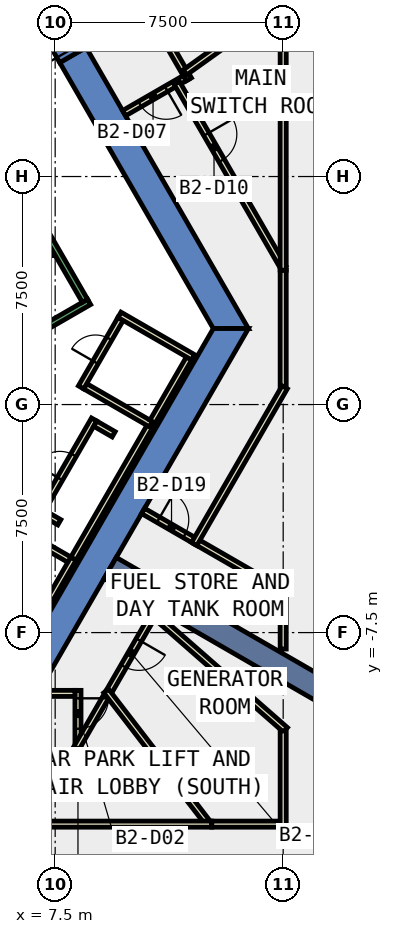
"""IFC4 building model, lengths in metres.
Left out: names, types, materials, properties, quantities, classifications, styles, units other than length and angle.
Written with IfcOpenShell. Run it as: python <this file> out.ifc"""

import sys

from ifc_helpers import new_model, si_unit, direction, frame, frame_2d, origin, place, context, subcontext, project, spatial, polyline, rectangle, outline, extrude, element, fill, save


model = new_model("IFC4")
c1 = context("Model", 3, precision=1e-05, world=origin(), true_north=direction((0.0, 1.0)))
c2 = subcontext(c1, "Body", "Model", "MODEL_VIEW")
j1 = project(units=[si_unit("LENGTHUNIT", "METRE"), si_unit("PLANEANGLEUNIT", "RADIAN")], contexts=[c1])
p1 = place(None, origin())
s1 = spatial("IfcSite", under=j1, at=p1, CompositionType="ELEMENT")
p2 = place(p1, origin())
s2 = spatial("IfcBuilding", under=s1, at=p2, CompositionType="ELEMENT")
p3 = place(p2, frame((0.0, 0.0, -11.0)))
s3 = spatial("IfcBuildingStorey", under=s2, at=p3, CompositionType="ELEMENT", Elevation=-11.0)
p4 = place(p3, frame((0.0, 0.0, -0.42)))
e1 = element("IfcWall", 1, at=p4, inside=s3, PredefinedType="SHEAR", context=c2, shape_type="SweptSolid", body=[
    extrude(outline(polyline([(8.517, 11.748), (7.651, 11.248), (12.702, 2.5), (13.856, 2.5), (8.517, 11.748)])), origin(), (0.0, 0.0, 1.0), 5.5),
])
p5 = place(p3, frame((0.0, 0.0, 3.6)))
e2 = element("IfcWall", 2, at=p5, inside=s3, PredefinedType="SHEAR", context=c2, shape_type="SweptSolid", body=[
    extrude(outline(polyline([(7.517, 13.48), (6.651, 12.98), (7.651, 11.248), (8.517, 11.748), (7.517, 13.48)])), origin(), (0.0, 0.0, 1.0), 1.48),
])
p6 = place(p3, frame((0.0, 0.0, -0.42)))
e3 = element("IfcWall", 3, at=p6, inside=s3, PredefinedType="SHEAR", context=c2, shape_type="SweptSolid", body=[
    extrude(outline(polyline([(6.928, -9.5), (13.856, 2.5), (12.702, 2.5), (6.351, -8.5), (6.928, -9.5)])), origin(), (0.0, 0.0, 1.0), 5.5),
])
p7 = place(p3, frame((9.31, -5.375, -0.42), z_axis=(0.0, 0.0, 1.0), x_axis=(0.866017533419, -0.500013631625, 0.0)))
e4 = element("IfcWall", 4, at=p7, inside=s3, PredefinedType="SHEAR", context=c2, shape_type="SweptSolid", body=[
    extrude(rectangle(XDim=9.0, YDim=0.8, at=frame_2d((4.5, 0.0))), origin(), (0.0, 0.0, 1.0), 5.5),
])
p8 = place(p3, frame((8.25, -9.4, 0.0), z_axis=(0.0, 0.0, 1.0), x_axis=(0.0, -1.0, 0.0)))
e5 = element("IfcWall", 5, at=p8, inside=s3, PredefinedType="PARTITIONING", context=c2, shape_type="SweptSolid", body=[
    extrude(rectangle(XDim=1.71, YDim=0.2, at=frame_2d((0.855, 0.0))), origin(), (0.0, 0.0, 1.0), 5.05),
])
p9 = place(p8, frame((0.262, 0.0, 0.0)))
e6 = element("IfcOpeningElement", 6, at=p9, cuts=e5, PredefinedType="OPENING", context=c2, shape_type="SweptSolid", body=[
    extrude(rectangle(XDim=1.0, YDim=2.1, at=frame_2d((0.5, 1.05))), frame((0.0, 0.11, 0.0), z_axis=(0.0, -1.0, 0.0), x_axis=(1.0, 0.0, 0.0)), (0.0, 0.0, 1.0), 0.22),
])
p10 = place(p3, frame((6.928, -9.5, 0.0), z_axis=(0.0, 0.0, 1.0), x_axis=(1.0, 0.0, 0.0)))
e7 = element("IfcWall", 7, at=p10, inside=s3, PredefinedType="PARTITIONING", context=c2, shape_type="SweptSolid", body=[
    extrude(rectangle(XDim=1.222, YDim=0.2, at=frame_2d((0.611, 0.0))), origin(), (0.0, 0.0, 1.0), 5.05),
])
p11 = place(p3, frame((8.25, -11.31, 0.0), z_axis=(0.0, 0.0, 1.0), x_axis=(0.0, -1.0, 0.0)))
e8 = element("IfcWall", 8, at=p11, inside=s3, PredefinedType="PARTITIONING", context=c2, shape_type="SweptSolid", body=[
    extrude(rectangle(XDim=0.49, YDim=0.2, at=frame_2d((0.245, 0.0))), origin(), (0.0, 0.0, 1.0), 5.05),
])
p12 = place(p3, frame((8.35, -11.9, 0.0), z_axis=(0.0, 0.0, 1.0), x_axis=(-1.0, 0.0, 0.0)))
e9 = element("IfcWall", 9, at=p12, inside=s3, PredefinedType="PARTITIONING", context=c2, shape_type="SweptSolid", body=[
    extrude(rectangle(XDim=7.039, YDim=0.2, at=frame_2d((3.52, 0.0))), origin(), (0.0, 0.0, 1.0), 5.05),
])
p13 = place(p12, frame((2.659, 0.0, 0.0)))
e10 = element("IfcOpeningElement", 10, at=p13, cuts=e9, PredefinedType="OPENING", context=c2, shape_type="SweptSolid", body=[
    extrude(rectangle(XDim=1.0, YDim=2.1, at=frame_2d((0.5, 1.05))), frame((0.0, 0.11, 0.0), z_axis=(0.0, -1.0, 0.0), x_axis=(1.0, 0.0, 0.0)), (0.0, 0.0, 1.0), 0.22),
])
p14 = place(p3, frame((9.238, -9.498, 0.0), z_axis=(0.0, 0.0, 1.0), x_axis=(-0.499780113518, -0.866152318089, 0.0)))
e11 = element("IfcWall", 11, at=p14, inside=s3, PredefinedType="PARTITIONING", context=c2, shape_type="SweptSolid", body=[
    extrude(rectangle(XDim=2.077, YDim=0.2, at=frame_2d((1.039, 0.0))), origin(), (0.0, 0.0, 1.0), 5.05),
])
p15 = place(p3, frame((10.738, -6.901, 0.0), z_axis=(0.0, 0.0, 1.0), x_axis=(-0.500131122175, -0.865949687125, 0.0)))
e12 = element("IfcWall", 12, at=p15, inside=s3, PredefinedType="PARTITIONING", context=c2, shape_type="SweptSolid", body=[
    extrude(rectangle(XDim=2.999, YDim=0.2, at=frame_2d((1.5, 0.0))), origin(), (0.0, 0.0, 1.0), 5.05),
])
p16 = place(p15, frame((0.972, 0.0, 0.0)))
e13 = element("IfcOpeningElement", 13, at=p16, cuts=e12, PredefinedType="OPENING", context=c2, shape_type="SweptSolid", body=[
    extrude(rectangle(XDim=1.0, YDim=2.1, at=frame_2d((0.5, 1.05))), frame((0.0, 0.11, 0.0), z_axis=(0.0, -1.0, 0.0), x_axis=(1.0, 0.0, 0.0)), (0.0, 0.0, 1.0), 0.22),
])
p17 = place(p3, frame((9.177, -9.419, 0.0), z_axis=(0.0, 0.0, 1.0), x_axis=(0.610158732695, -0.792279193792, 0.0)))
e14 = element("IfcWall", 14, at=p17, inside=s3, PredefinedType="PARTITIONING", context=c2, shape_type="SweptSolid", body=[
    extrude(rectangle(XDim=5.53, YDim=0.2, at=frame_2d((2.765, 0.0))), origin(), (0.0, 0.0, 1.0), 5.05),
])
p18 = place(p3, frame((12.651, -13.8, 0.0), z_axis=(0.0, 0.0, 1.0), x_axis=(-1.0, 0.0, 0.0)))
e15 = element("IfcWall", 15, at=p18, inside=s3, PredefinedType="PARTITIONING", context=c2, shape_type="SweptSolid", body=[
    extrude(rectangle(XDim=11.154, YDim=0.2, at=frame_2d((5.577, 0.0))), origin(), (0.0, 0.0, 1.0), 5.05),
])
p19 = place(p18, frame((6.675, 0.0, 0.0)))
e16 = element("IfcOpeningElement", 16, at=p19, cuts=e15, PredefinedType="OPENING", context=c2, shape_type="SweptSolid", body=[
    extrude(rectangle(XDim=1.8, YDim=2.1, at=frame_2d((0.9, 1.05))), frame((0.0, 0.11, 0.0), z_axis=(0.0, -1.0, 0.0), x_axis=(1.0, 0.0, 0.0)), (0.0, 0.0, 1.0), 0.22),
])
p20 = place(p3, frame((14.9, -13.8, 0.0), z_axis=(0.0, 0.0, 1.0), x_axis=(-1.0, 0.0, 0.0)))
e17 = element("IfcWall", 17, at=p20, inside=s3, PredefinedType="PARTITIONING", context=c2, shape_type="SweptSolid", body=[
    extrude(rectangle(XDim=2.249, YDim=0.2, at=frame_2d((1.125, 0.0))), origin(), (0.0, 0.0, 1.0), 5.05),
])
p21 = place(p3, frame((10.663, -6.835, 0.0), z_axis=(0.0, 0.0, 1.0), x_axis=(0.752269740493, -0.658855247788, 0.0)))
e18 = element("IfcWall", 18, at=p21, inside=s3, PredefinedType="PARTITIONING", context=c2, shape_type="SweptSolid", body=[
    extrude(rectangle(XDim=5.865, YDim=0.2, at=frame_2d((2.932, 0.0))), origin(), (0.0, 0.0, 1.0), 5.05),
])
p22 = place(p3, frame((15.0, -10.733, 0.0), z_axis=(0.0, 0.0, 1.0), x_axis=(0.0, -1.0, 0.0)))
e19 = element("IfcWall", 19, at=p22, inside=s3, PredefinedType="PARTITIONING", context=c2, shape_type="SweptSolid", body=[
    extrude(rectangle(XDim=3.167, YDim=0.2, at=frame_2d((1.583, 0.0))), origin(), (0.0, 0.0, 1.0), 5.05),
])
p23 = place(p3, frame((10.392, -3.5, 0.0), z_axis=(0.0, 0.0, 1.0), x_axis=(0.866010750942, -0.50002537861, 0.0)))
e20 = element("IfcWall", 20, at=p23, inside=s3, PredefinedType="PARTITIONING", context=c2, shape_type="SweptSolid", body=[
    extrude(rectangle(XDim=2.0, YDim=0.2, at=frame_2d((1.0, 0.0))), origin(), (0.0, 0.0, 1.0), 5.05),
])
p24 = place(p23, frame((0.58, 0.0, 0.0)))
e21 = element("IfcOpeningElement", 21, at=p24, cuts=e20, PredefinedType="OPENING", context=c2, shape_type="SweptSolid", body=[
    extrude(rectangle(XDim=1.0, YDim=2.1, at=frame_2d((0.5, 1.05))), frame((0.0, 0.11, 0.0), z_axis=(0.0, -1.0, 0.0), x_axis=(1.0, 0.0, 0.0)), (0.0, 0.0, 1.0), 0.22),
])
p25 = place(p3, frame((12.124, -4.5, 0.0), z_axis=(0.0, 0.0, 1.0), x_axis=(0.866109535743, -0.499854250852, 0.0)))
e22 = element("IfcWall", 22, at=p25, inside=s3, PredefinedType="PARTITIONING", context=c2, shape_type="SweptSolid", body=[
    extrude(rectangle(XDim=3.421, YDim=0.2, at=frame_2d((1.71, 0.0))), origin(), (0.0, 0.0, 1.0), 5.05),
])
p26 = place(p3, frame((15.0, -6.26, 0.0), z_axis=(0.0, 0.0, 1.0), x_axis=(0.0, -1.0, 0.0)))
e23 = element("IfcWall", 23, at=p26, inside=s3, PredefinedType="PARTITIONING", context=c2, shape_type="SweptSolid", body=[
    extrude(rectangle(XDim=1.781, YDim=0.2, at=frame_2d((0.891, 0.0))), origin(), (0.0, 0.0, 1.0), 5.05),
])
p27 = place(p3, frame((11.845, 10.783, 0.0), z_axis=(0.0, 0.0, 1.0), x_axis=(-0.865973769406, -0.500089422704, 0.0)))
e24 = element("IfcWall", 24, at=p27, inside=s3, PredefinedType="PARTITIONING", context=c2, shape_type="SweptSolid", body=[
    extrude(rectangle(XDim=2.399, YDim=0.2, at=frame_2d((1.2, 0.0))), origin(), (0.0, 0.0, 1.0), 5.05),
])
p28 = place(p27, frame((0.8, 0.0, 0.0)))
e25 = element("IfcOpeningElement", 25, at=p28, cuts=e24, PredefinedType="OPENING", context=c2, shape_type="SweptSolid", body=[
    extrude(rectangle(XDim=1.0, YDim=2.1, at=frame_2d((0.5, 1.05))), frame((0.0, 0.11, 0.0), z_axis=(0.0, -1.0, 0.0), x_axis=(1.0, 0.0, 0.0)), (0.0, 0.0, 1.0), 0.22),
])
p29 = place(p3, frame((8.295, 16.932, 0.0), z_axis=(0.0, 0.0, 1.0), x_axis=(0.499982693035, -0.866035395735, 0.0)))
e26 = element("IfcWall", 26, at=p29, inside=s3, PredefinedType="PARTITIONING", context=c2, shape_type="SweptSolid", body=[
    extrude(rectangle(XDim=7.2, YDim=0.2, at=frame_2d((3.6, 0.0))), origin(), (0.0, 0.0, 1.0), 5.05),
])
p30 = place(p29, frame((2.659, 0.0, 0.0)))
e27 = element("IfcOpeningElement", 27, at=p30, cuts=e26, PredefinedType="OPENING", context=c2, shape_type="SweptSolid", body=[
    extrude(rectangle(XDim=1.0, YDim=2.1, at=frame_2d((0.5, 1.05))), frame((0.0, 0.11, 0.0), z_axis=(0.0, -1.0, 0.0), x_axis=(1.0, 0.0, 0.0)), (0.0, 0.0, 1.0), 0.22),
])
p31 = place(p3, frame((11.499, 10.583, 0.0), z_axis=(0.0, 0.0, 1.0), x_axis=(0.499994090379, -0.866028815679, 0.0)))
e28 = element("IfcWall", 28, at=p31, inside=s3, PredefinedType="PARTITIONING", context=c2, shape_type="SweptSolid", body=[
    extrude(rectangle(XDim=7.002, YDim=0.2, at=frame_2d((3.501, 0.0))), origin(), (0.0, 0.0, 1.0), 5.05),
])
p32 = place(p31, frame((1.952, 0.0, 0.0)))
e29 = element("IfcOpeningElement", 29, at=p32, cuts=e28, PredefinedType="OPENING", context=c2, shape_type="SweptSolid", body=[
    extrude(rectangle(XDim=1.0, YDim=2.1, at=frame_2d((0.5, 1.05))), frame((0.0, 0.11, 0.0), z_axis=(0.0, -1.0, 0.0), x_axis=(1.0, 0.0, 0.0)), (0.0, 0.0, 1.0), 0.22),
])
p33 = place(p3, frame((15.0, 4.419, 0.0), z_axis=(0.0, 0.0, 1.0), x_axis=(0.0, -1.0, 0.0)))
e30 = element("IfcWall", 30, at=p33, inside=s3, PredefinedType="PARTITIONING", context=c2, shape_type="SweptSolid", body=[
    extrude(rectangle(XDim=3.838, YDim=0.2, at=frame_2d((1.919, 0.0))), origin(), (0.0, 0.0, 1.0), 5.05),
])
p34 = place(p3, frame((15.05, 0.568, 0.0), z_axis=(0.0, 0.0, 1.0), x_axis=(-0.500047946832, -0.865997719899, 0.0)))
e31 = element("IfcWall", 31, at=p34, inside=s3, PredefinedType="PARTITIONING", context=c2, shape_type="SweptSolid", body=[
    extrude(rectangle(XDim=5.952, YDim=0.2, at=frame_2d((2.976, 0.0))), origin(), (0.0, 0.0, 1.0), 5.05),
])
p35 = place(p3, frame((14.919, 13.18, 0.0), z_axis=(0.0, 0.0, 1.0), x_axis=(-0.81313339858, -0.582077379833, 0.0)))
e32 = element("IfcWall", 32, at=p35, inside=s3, PredefinedType="PARTITIONING", context=c2, shape_type="SweptSolid", body=[
    extrude(rectangle(XDim=3.879, YDim=0.2, at=frame_2d((1.939, 0.0))), origin(), (0.0, 0.0, 1.0), 5.05),
])
p36 = place(p3, frame((15.0, 13.138, 0.0), z_axis=(0.0, 0.0, 1.0), x_axis=(0.0, -1.0, 0.0)))
e33 = element("IfcWall", 33, at=p36, inside=s3, PredefinedType="PARTITIONING", context=c2, shape_type="SweptSolid", body=[
    extrude(rectangle(XDim=8.719, YDim=0.2, at=frame_2d((4.359, 0.0))), origin(), (0.0, 0.0, 1.0), 5.05),
])
p37 = place(p3, frame((5.888, -3.902, 0.0), z_axis=(0.0, 0.0, 1.0), x_axis=(0.866022959057, -0.500004234368, 0.0)))
e34 = element("IfcWall", 34, at=p37, inside=s3, PredefinedType="PARTITIONING", context=c2, shape_type="SweptSolid", body=[
    extrude(rectangle(XDim=2.5, YDim=0.2, at=frame_2d((1.25, 0.0))), origin(), (0.0, 0.0, 1.0), 5.05),
])
p38 = place(p3, frame((8.103, -5.065, 0.0), z_axis=(0.0, 0.0, 1.0), x_axis=(-0.49996627774, -0.866044872465, 0.0)))
e35 = element("IfcWall", 35, at=p38, inside=s3, PredefinedType="PARTITIONING", context=c2, shape_type="SweptSolid", body=[
    extrude(rectangle(XDim=2.6, YDim=0.2, at=frame_2d((1.3, 0.0))), origin(), (0.0, 0.0, 1.0), 5.05),
])
p39 = place(p3, frame((7.637, -3.872, 0.0), z_axis=(0.0, 0.0, 1.0), x_axis=(-0.866158505053, 0.499769390944, 0.0)))
e36 = element("IfcWall", 36, at=p39, inside=s3, PredefinedType="PARTITIONING", context=c2, shape_type="SweptSolid", body=[
    extrude(rectangle(XDim=0.6, YDim=0.2, at=frame_2d((0.3, 0.0))), origin(), (0.0, 0.0, 1.0), 5.05),
])
p40 = place(p3, frame((6.981, -3.609, 0.0), z_axis=(0.0, 0.0, 1.0), x_axis=(0.499982693035, 0.866035395735, 0.0)))
e37 = element("IfcWall", 37, at=p40, inside=s3, PredefinedType="PARTITIONING", context=c2, shape_type="SweptSolid", body=[
    extrude(rectangle(XDim=3.6, YDim=0.2, at=frame_2d((1.8, 0.0))), origin(), (0.0, 0.0, 1.0), 5.05),
])
p41 = place(p40, frame((1.35, 0.0, 0.0)))
e38 = element("IfcOpeningElement", 38, at=p41, cuts=e37, PredefinedType="OPENING", context=c2, shape_type="SweptSolid", body=[
    extrude(rectangle(XDim=0.9, YDim=2.1, at=frame_2d((0.45, 1.05))), frame((0.0, 0.11, 0.0), z_axis=(0.0, -1.0, 0.0), x_axis=(1.0, 0.0, 0.0)), (0.0, 0.0, 1.0), 0.22),
])
p42 = place(p3, frame((8.817, -0.628, 0.0), z_axis=(0.0, 0.0, 1.0), x_axis=(0.866307342011, -0.4995113504, 0.0)))
e39 = element("IfcWall", 39, at=p42, inside=s3, PredefinedType="PARTITIONING", context=c2, shape_type="SweptSolid", body=[
    extrude(rectangle(XDim=0.701, YDim=0.2, at=frame_2d((0.351, 0.0))), origin(), (0.0, 0.0, 1.0), 5.05),
])
p43 = place(p3, frame((10.703, -0.562, 0.0), z_axis=(0.0, 0.0, 1.0), x_axis=(-0.500012382935, -0.866018254376, 0.0)))
e40 = element("IfcWall", 40, at=p43, inside=s3, PredefinedType="PARTITIONING", context=c2, shape_type="SweptSolid", body=[
    extrude(rectangle(XDim=5.199, YDim=0.2, at=frame_2d((2.6, 0.0))), origin(), (0.0, 0.0, 1.0), 5.05),
])
p44 = place(p3, frame((10.653, -0.648, 0.0), z_axis=(0.0, 0.0, 1.0), x_axis=(-0.866022959057, 0.500004234368, 0.0)))
e41 = element("IfcWall", 41, at=p44, inside=s3, PredefinedType="PARTITIONING", context=c2, shape_type="SweptSolid", body=[
    extrude(rectangle(XDim=2.5, YDim=0.2, at=frame_2d((1.25, 0.0))), origin(), (0.0, 0.0, 1.0), 5.05),
])
p45 = place(p3, frame((11.903, 1.517, 0.0), z_axis=(0.0, 0.0, 1.0), x_axis=(-0.499945471869, -0.866056883327, 0.0)))
e42 = element("IfcWall", 42, at=p45, inside=s3, PredefinedType="PARTITIONING", context=c2, shape_type="SweptSolid", body=[
    extrude(rectangle(XDim=2.401, YDim=0.2, at=frame_2d((1.2, 0.0))), origin(), (0.0, 0.0, 1.0), 5.05),
])
p46 = place(p3, frame((8.351, 0.565, 0.0), z_axis=(0.0, 0.0, 1.0), x_axis=(0.49989585183, 0.866085525409, 0.0)))
e43 = element("IfcWall", 43, at=p46, inside=s3, PredefinedType="PARTITIONING", context=c2, shape_type="SweptSolid", body=[
    extrude(rectangle(XDim=2.6, YDim=0.2, at=frame_2d((1.3, 0.0))), origin(), (0.0, 0.0, 1.0), 5.05),
])
p47 = place(p46, frame((0.95, 0.0, 0.0)))
e44 = element("IfcOpeningElement", 44, at=p47, cuts=e43, PredefinedType="OPENING", context=c2, shape_type="SweptSolid", body=[
    extrude(rectangle(XDim=0.9, YDim=2.1, at=frame_2d((0.45, 1.05))), frame((0.0, 0.11, 0.0), z_axis=(0.0, -1.0, 0.0), x_axis=(1.0, 0.0, 0.0)), (0.0, 0.0, 1.0), 0.22),
])
p48 = place(p3, frame((9.615, 2.953, 0.0), z_axis=(0.0, 0.0, 1.0), x_axis=(0.866056369097, -0.49994636267, 0.0)))
e45 = element("IfcWall", 45, at=p48, inside=s3, PredefinedType="PARTITIONING", context=c2, shape_type="SweptSolid", body=[
    extrude(rectangle(XDim=2.8, YDim=0.2, at=frame_2d((1.4, 0.0))), origin(), (0.0, 0.0, 1.0), 5.05),
])
p49 = place(p3, frame((4.806, 1.176, 0.0), z_axis=(0.0, 0.0, 1.0), x_axis=(0.866059941101, 0.499940174841, 0.0)))
e46 = element("IfcWall", 46, at=p49, inside=s3, PredefinedType="STANDARD", context=c2, shape_type="SweptSolid", body=[
    extrude(rectangle(XDim=4.4, YDim=0.2, at=frame_2d((2.2, 0.0))), origin(), (0.0, 0.0, 1.0), 5.05),
])
p50 = place(p49, frame((1.65, 0.0, 0.0)))
e47 = element("IfcOpeningElement", 47, at=p50, cuts=e46, PredefinedType="OPENING", context=c2, shape_type="SweptSolid", body=[
    extrude(rectangle(XDim=1.1, YDim=2.2, at=frame_2d((0.55, 1.1))), frame((0.0, 0.11, 0.0), z_axis=(0.0, -1.0, 0.0), x_axis=(1.0, 0.0, 0.0)), (0.0, 0.0, 1.0), 0.22),
])
p51 = place(p3, frame((8.48, 3.412, 0.0), z_axis=(0.0, 0.0, 1.0), x_axis=(-0.499978703459, 0.866037698999, 0.0)))
e48 = element("IfcWall", 48, at=p51, inside=s3, PredefinedType="STANDARD", context=c2, shape_type="SweptSolid", body=[
    extrude(rectangle(XDim=6.9, YDim=0.2, at=frame_2d((3.45, 0.0))), origin(), (0.0, 0.0, 1.0), 5.05),
])
p52 = place(p9, origin())
e49 = element("IfcDoor", 49, at=p52, inside=s3, OperationType="SINGLE_SWING_RIGHT", PredefinedType="DOOR", context=c2, shape_type="SweptSolid", body=[
    extrude(rectangle(XDim=1.0, YDim=2.1, at=frame_2d((0.5, 1.05))), frame((0.0, 0.025, 0.0), z_axis=(0.0, -1.0, 0.0), x_axis=(1.0, 0.0, 0.0)), (0.0, 0.0, 1.0), 0.05),
])
fill(e6, e49)
p53 = place(p16, origin())
e50 = element("IfcDoor", 50, at=p53, inside=s3, OperationType="SINGLE_SWING_RIGHT", PredefinedType="DOOR", context=c2, shape_type="SweptSolid", body=[
    extrude(rectangle(XDim=1.0, YDim=2.1, at=frame_2d((0.5, 1.05))), frame((0.0, 0.025, 0.0), z_axis=(0.0, -1.0, 0.0), x_axis=(1.0, 0.0, 0.0)), (0.0, 0.0, 1.0), 0.05),
])
fill(e13, e50)
p54 = place(p28, origin())
e51 = element("IfcDoor", 51, at=p54, inside=s3, OperationType="SINGLE_SWING_LEFT", PredefinedType="DOOR", context=c2, shape_type="SweptSolid", body=[
    extrude(rectangle(XDim=1.0, YDim=2.1, at=frame_2d((0.5, 1.05))), frame((0.0, 0.025, 0.0), z_axis=(0.0, -1.0, 0.0), x_axis=(1.0, 0.0, 0.0)), (0.0, 0.0, 1.0), 0.05),
])
fill(e25, e51)
p55 = place(p32, origin())
e52 = element("IfcDoor", 52, at=p55, inside=s3, OperationType="SINGLE_SWING_RIGHT", PredefinedType="DOOR", context=c2, shape_type="SweptSolid", body=[
    extrude(rectangle(XDim=1.0, YDim=2.1, at=frame_2d((0.5, 1.05))), frame((0.0, 0.025, 0.0), z_axis=(0.0, -1.0, 0.0), x_axis=(1.0, 0.0, 0.0)), (0.0, 0.0, 1.0), 0.05),
])
fill(e29, e52)
p56 = place(p24, origin())
e53 = element("IfcDoor", 53, at=p56, inside=s3, OperationType="SINGLE_SWING_LEFT", PredefinedType="DOOR", context=c2, shape_type="SweptSolid", body=[
    extrude(rectangle(XDim=1.0, YDim=2.1, at=frame_2d((0.5, 1.05))), frame((0.0, 0.025, 0.0), z_axis=(0.0, -1.0, 0.0), x_axis=(1.0, 0.0, 0.0)), (0.0, 0.0, 1.0), 0.05),
])
fill(e21, e53)
p57 = place(p41, origin())
e54 = element("IfcDoor", 54, at=p57, inside=s3, OperationType="SINGLE_SWING_RIGHT", PredefinedType="DOOR", context=c2, shape_type="SweptSolid", body=[
    extrude(rectangle(XDim=0.9, YDim=2.1, at=frame_2d((0.45, 1.05))), frame((0.0, 0.025, 0.0), z_axis=(0.0, -1.0, 0.0), x_axis=(1.0, 0.0, 0.0)), (0.0, 0.0, 1.0), 0.05),
])
fill(e38, e54)
p58 = place(p47, origin())
e55 = element("IfcDoor", 55, at=p58, inside=s3, OperationType="SINGLE_SWING_LEFT", PredefinedType="DOOR", context=c2, shape_type="SweptSolid", body=[
    extrude(rectangle(XDim=0.9, YDim=2.1, at=frame_2d((0.45, 1.05))), frame((0.0, 0.025, 0.0), z_axis=(0.0, -1.0, 0.0), x_axis=(1.0, 0.0, 0.0)), (0.0, 0.0, 1.0), 0.05),
])
fill(e44, e55)
save(model, sys.argv[1])
